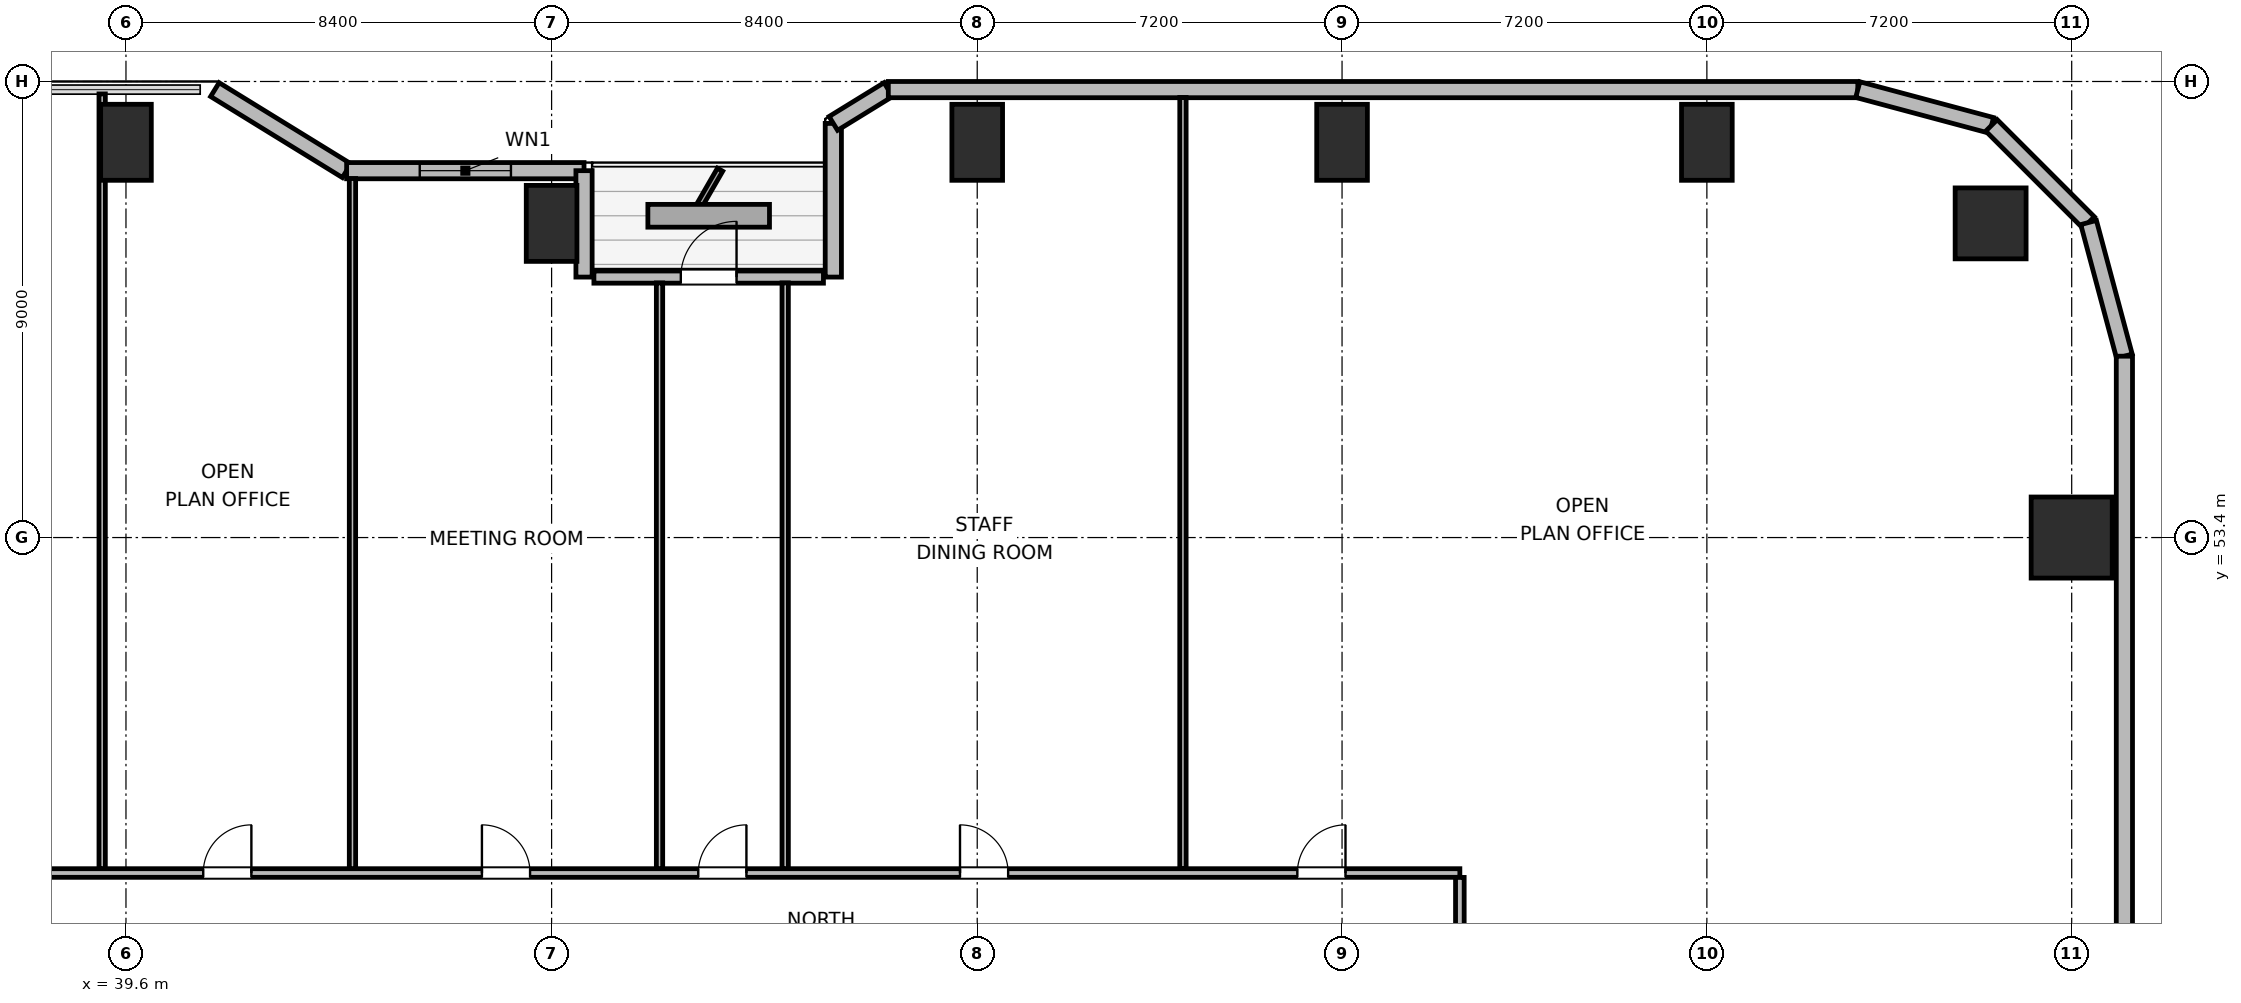
"""IFC4 building model, lengths in metres.
Left out: names, types, materials, properties, quantities, classifications, styles, units other than length and angle.
Written with IfcOpenShell. Run it as: python <this file> out.ifc"""

import sys

from ifc_helpers import new_model, si_unit, direction, frame, frame_2d, origin, origin_2d, place, context, subcontext, project, spatial, rectangle, circle, extrude, element, fill, save


model = new_model("IFC4")
c1 = context("Model", 3, precision=1e-05, world=origin(), true_north=direction((0.0, 1.0)))
c2 = subcontext(c1, "Body", "Model", "MODEL_VIEW")
j1 = project(units=[si_unit("LENGTHUNIT", "METRE"), si_unit("PLANEANGLEUNIT", "RADIAN")], contexts=[c1])
p1 = place(None, origin())
s1 = spatial("IfcSite", under=j1, at=p1, CompositionType="ELEMENT")
p2 = place(p1, origin())
s2 = spatial("IfcBuilding", under=s1, at=p2, CompositionType="ELEMENT")
p3 = place(p2, frame((0.0, 0.0, 33.3)))
s3 = spatial("IfcBuildingStorey", under=s2, at=p3, CompositionType="ELEMENT", Elevation=33.3)
p4 = place(p3, frame((76.4, 59.6, 0.0), z_axis=(0.0, 0.0, 1.0), x_axis=(1.0, 0.0, 0.0)))
e1 = element("IfcColumn", 1, at=p4, inside=s3, PredefinedType="COLUMN", context=c2, shape_type="SweptSolid", body=[
    extrude(circle(Radius=0.7, at=origin_2d()), origin(), (0.0, 0.0, 1.0), 3.9),
])
for number, where, z_axis, x_axis in (
    (2, (39.6, 61.2, 0.0), (0.0, 0.0, 1.0), (1.0, 0.0, 0.0)),
    (3, (48.0, 59.6, 0.0), (0.0, 0.0, 1.0), (1.0, 0.0, 0.0)),
    (4, (56.4, 61.2, 0.0), (0.0, 0.0, 1.0), (1.0, 0.0, 0.0)),
    (5, (63.6, 61.2, 0.0), (0.0, 0.0, 1.0), (1.0, 0.0, 0.0)),
    (6, (70.8, 61.2, 0.0), (0.0, 0.0, 1.0), (1.0, 0.0, 0.0)),
):
    element("IfcColumn", number, at=place(p3, frame(where, z_axis=z_axis, x_axis=x_axis)), inside=s3, PredefinedType="COLUMN", context=c2, shape_type="SweptSolid", body=[
        extrude(rectangle(XDim=1.0, YDim=1.5, at=origin_2d()), origin(), (0.0, 0.0, 1.0), 3.9),
    ])
p5 = place(p3, frame((78.0, 53.4, 0.0), z_axis=(0.0, 0.0, 1.0), x_axis=(1.0, 0.0, 0.0)))
e7 = element("IfcColumn", 7, at=p5, inside=s3, PredefinedType="COLUMN", context=c2, shape_type="SweptSolid", body=[
    extrude(rectangle(XDim=1.6, YDim=1.6, at=origin_2d()), origin(), (0.0, 0.0, 1.0), 3.9),
])
p6 = place(p3, frame((41.355, 62.24, 0.0), z_axis=(0.0, 0.0, 1.0), x_axis=(0.851630857047, -0.524142044989, 0.0)))
e8 = element("IfcWall", 8, at=p6, inside=s3, PredefinedType="SOLIDWALL", context=c2, shape_type="SweptSolid", body=[
    extrude(rectangle(XDim=3.053, YDim=0.32, at=frame_2d((1.526, 0.0))), origin(), (0.0, 0.0, 1.0), 2.875),
])
p7 = place(p3, frame((43.955, 60.64, 0.0), z_axis=(0.0, 0.0, 1.0), x_axis=(1.0, 0.0, 0.0)))
e9 = element("IfcWall", 9, at=p7, inside=s3, PredefinedType="SOLIDWALL", context=c2, shape_type="SweptSolid", body=[
    extrude(rectangle(XDim=4.685, YDim=0.32, at=frame_2d((2.343, 0.0))), origin(), (0.0, 0.0, 1.0), 2.875),
])
p8 = place(p7, frame((1.443, 0.0, 0.85)))
e10 = element("IfcOpeningElement", 10, at=p8, cuts=e9, PredefinedType="OPENING", context=c2, shape_type="SweptSolid", body=[
    extrude(rectangle(XDim=1.8, YDim=1.1, at=frame_2d((0.9, 0.55))), frame((0.0, 0.17, 0.0), z_axis=(0.0, -1.0, 0.0), x_axis=(1.0, 0.0, 0.0)), (0.0, 0.0, 1.0), 0.34),
])
p9 = place(p3, frame((48.64, 60.64, 0.0), z_axis=(0.0, 0.0, 1.0), x_axis=(0.0, -1.0, 0.0)))
e11 = element("IfcWall", 11, at=p9, inside=s3, PredefinedType="SOLIDWALL", context=c2, shape_type="SweptSolid", body=[
    extrude(rectangle(XDim=2.1, YDim=0.32, at=frame_2d((1.05, 0.0))), origin(), (0.0, 0.0, 1.0), 2.875),
])
p10 = place(p3, frame((48.835, 58.54, 0.0), z_axis=(0.0, 0.0, 1.0), x_axis=(1.0, 0.0, 0.0)))
e12 = element("IfcWall", 12, at=p10, inside=s3, PredefinedType="SOLIDWALL", context=c2, shape_type="SweptSolid", body=[
    extrude(rectangle(XDim=4.53, YDim=0.24, at=frame_2d((2.265, 0.0))), origin(), (0.0, 0.0, 1.0), 3.64),
])
p11 = place(p10, frame((1.715, 0.0, 0.0)))
e13 = element("IfcOpeningElement", 13, at=p11, cuts=e12, PredefinedType="OPENING", context=c2, shape_type="SweptSolid", body=[
    extrude(rectangle(XDim=1.1, YDim=2.04, at=frame_2d((0.55, 1.02))), frame((0.0, 0.13, 0.0), z_axis=(0.0, -1.0, 0.0), x_axis=(1.0, 0.0, 0.0)), (0.0, 0.0, 1.0), 0.26),
])
p12 = place(p3, frame((53.56, 58.54, 0.0), z_axis=(0.0, 0.0, 1.0), x_axis=(0.0, 1.0, 0.0)))
e14 = element("IfcWall", 14, at=p12, inside=s3, PredefinedType="SOLIDWALL", context=c2, shape_type="SweptSolid", body=[
    extrude(rectangle(XDim=3.032, YDim=0.32, at=frame_2d((1.516, 0.0))), origin(), (0.0, 0.0, 1.0), 2.875),
])
p13 = place(p3, frame((53.56, 61.573, 0.0), z_axis=(0.0, 0.0, 1.0), x_axis=(0.851776724646, 0.523904964045, 0.0)))
e15 = element("IfcWall", 15, at=p13, inside=s3, PredefinedType="SOLIDWALL", context=c2, shape_type="SweptSolid", body=[
    extrude(rectangle(XDim=1.274, YDim=0.32, at=frame_2d((0.637, 0.0))), origin(), (0.0, 0.0, 1.0), 3.64),
])
p14 = place(p3, frame((54.645, 62.24, 0.0), z_axis=(0.0, 0.0, 1.0), x_axis=(1.0, 0.0, 0.0)))
e16 = element("IfcWall", 16, at=p14, inside=s3, PredefinedType="SOLIDWALL", context=c2, shape_type="SweptSolid", body=[
    extrude(rectangle(XDim=19.134, YDim=0.32, at=frame_2d((9.567, 0.0))), origin(), (0.0, 0.0, 1.0), 3.64),
])
p15 = place(p3, frame((73.779, 62.24, 0.0), z_axis=(0.0, 0.0, 1.0), x_axis=(0.965964405026, -0.25867502435, 0.0)))
e17 = element("IfcWall", 17, at=p15, inside=s3, PredefinedType="SOLIDWALL", context=c2, shape_type="SweptSolid", body=[
    extrude(rectangle(XDim=2.731, YDim=0.32, at=frame_2d((1.366, 0.0))), origin(), (0.0, 0.0, 1.0), 3.64),
])
p16 = place(p3, frame((76.417, 61.533, 0.0), z_axis=(0.0, 0.0, 1.0), x_axis=(0.707106781187, -0.707106781187, 0.0)))
e18 = element("IfcWall", 18, at=p16, inside=s3, PredefinedType="SOLIDWALL", context=c2, shape_type="SweptSolid", body=[
    extrude(rectangle(XDim=2.71, YDim=0.32, at=frame_2d((1.355, 0.0))), origin(), (0.0, 0.0, 1.0), 3.64),
])
p17 = place(p3, frame((78.333, 59.617, 0.0), z_axis=(0.0, 0.0, 1.0), x_axis=(0.25869736047, -0.965958423373, 0.0)))
e19 = element("IfcWall", 19, at=p17, inside=s3, PredefinedType="SOLIDWALL", context=c2, shape_type="SweptSolid", body=[
    extrude(rectangle(XDim=2.731, YDim=0.32, at=frame_2d((1.366, 0.0))), origin(), (0.0, 0.0, 1.0), 3.64),
])
p18 = place(p3, frame((79.04, 56.979, 0.0), z_axis=(0.0, 0.0, 1.0), x_axis=(0.0, -1.0, 0.0)))
e20 = element("IfcWall", 20, at=p18, inside=s3, PredefinedType="SOLIDWALL", context=c2, shape_type="SweptSolid", body=[
    extrude(rectangle(XDim=14.219, YDim=0.32, at=frame_2d((7.109, 0.0))), origin(), (0.0, 0.0, 1.0), 3.64),
])
p19 = place(p3, frame((30.075, 46.78, 0.0), z_axis=(0.0, 0.0, 1.0), x_axis=(1.0, 0.0, 0.0)))
e21 = element("IfcWall", 21, at=p19, inside=s3, PredefinedType="PARTITIONING", context=c2, shape_type="SweptSolid", body=[
    extrude(rectangle(XDim=35.85, YDim=0.17, at=frame_2d((17.925, 0.0))), origin(), (0.0, 0.0, 1.0), 3.64),
])
p20 = place(p19, frame((4.053, 0.0, 0.0)))
e22 = element("IfcOpeningElement", 22, at=p20, cuts=e21, PredefinedType="OPENING", context=c2, shape_type="SweptSolid", body=[
    extrude(rectangle(XDim=0.95, YDim=2.04, at=frame_2d((0.475, 1.02))), frame((0.0, 0.095, 0.0), z_axis=(0.0, -1.0, 0.0), x_axis=(1.0, 0.0, 0.0)), (0.0, 0.0, 1.0), 0.19),
])
p21 = place(p19, frame((11.05, 0.0, 0.0)))
e23 = element("IfcOpeningElement", 23, at=p21, cuts=e21, PredefinedType="OPENING", context=c2, shape_type="SweptSolid", body=[
    extrude(rectangle(XDim=0.95, YDim=2.04, at=frame_2d((0.475, 1.02))), frame((0.0, 0.095, 0.0), z_axis=(0.0, -1.0, 0.0), x_axis=(1.0, 0.0, 0.0)), (0.0, 0.0, 1.0), 0.19),
])
p22 = place(p19, frame((16.55, 0.0, 0.0)))
e24 = element("IfcOpeningElement", 24, at=p22, cuts=e21, PredefinedType="OPENING", context=c2, shape_type="SweptSolid", body=[
    extrude(rectangle(XDim=0.95, YDim=2.04, at=frame_2d((0.475, 1.02))), frame((0.0, 0.095, 0.0), z_axis=(0.0, -1.0, 0.0), x_axis=(1.0, 0.0, 0.0)), (0.0, 0.0, 1.0), 0.19),
])
p23 = place(p19, frame((20.82, 0.0, 0.0)))
e25 = element("IfcOpeningElement", 25, at=p23, cuts=e21, PredefinedType="OPENING", context=c2, shape_type="SweptSolid", body=[
    extrude(rectangle(XDim=0.95, YDim=2.04, at=frame_2d((0.475, 1.02))), frame((0.0, 0.095, 0.0), z_axis=(0.0, -1.0, 0.0), x_axis=(1.0, 0.0, 0.0)), (0.0, 0.0, 1.0), 0.19),
])
p24 = place(p19, frame((25.985, 0.0, 0.0)))
e26 = element("IfcOpeningElement", 26, at=p24, cuts=e21, PredefinedType="OPENING", context=c2, shape_type="SweptSolid", body=[
    extrude(rectangle(XDim=0.95, YDim=2.04, at=frame_2d((0.475, 1.02))), frame((0.0, 0.095, 0.0), z_axis=(0.0, -1.0, 0.0), x_axis=(1.0, 0.0, 0.0)), (0.0, 0.0, 1.0), 0.19),
])
p25 = place(p19, frame((32.643, 0.0, 0.0)))
e27 = element("IfcOpeningElement", 27, at=p25, cuts=e21, PredefinedType="OPENING", context=c2, shape_type="SweptSolid", body=[
    extrude(rectangle(XDim=0.95, YDim=2.04, at=frame_2d((0.475, 1.02))), frame((0.0, 0.095, 0.0), z_axis=(0.0, -1.0, 0.0), x_axis=(1.0, 0.0, 0.0)), (0.0, 0.0, 1.0), 0.19),
])
p26 = place(p3, frame((65.925, 25.307, 0.0), z_axis=(0.0, 0.0, 1.0), x_axis=(0.0, 1.0, 0.0)))
e28 = element("IfcWall", 28, at=p26, inside=s3, PredefinedType="PARTITIONING", context=c2, shape_type="SweptSolid", body=[
    extrude(rectangle(XDim=21.386, YDim=0.17, at=frame_2d((10.693, 0.0))), origin(), (0.0, 0.0, 1.0), 3.64),
])
p27 = place(p26, frame((5.428, 0.0, 0.0)))
e29 = element("IfcOpeningElement", 29, at=p27, cuts=e28, PredefinedType="OPENING", context=c2, shape_type="SweptSolid", body=[
    extrude(rectangle(XDim=0.95, YDim=2.04, at=frame_2d((0.475, 1.02))), frame((0.0, 0.095, 0.0), z_axis=(0.0, -1.0, 0.0), x_axis=(1.0, 0.0, 0.0)), (0.0, 0.0, 1.0), 0.19),
])
p28 = place(p26, frame((16.208, 0.0, 0.0)))
e30 = element("IfcOpeningElement", 30, at=p28, cuts=e28, PredefinedType="OPENING", context=c2, shape_type="SweptSolid", body=[
    extrude(rectangle(XDim=0.95, YDim=2.04, at=frame_2d((0.475, 1.02))), frame((0.0, 0.095, 0.0), z_axis=(0.0, -1.0, 0.0), x_axis=(1.0, 0.0, 0.0)), (0.0, 0.0, 1.0), 0.19),
])
p29 = place(p3, frame((39.13, 46.867, 0.0), z_axis=(0.0, 0.0, 1.0), x_axis=(0.0, 1.0, 0.0)))
e31 = element("IfcWall", 31, at=p29, inside=s3, PredefinedType="PARTITIONING", context=c2, shape_type="SweptSolid", body=[
    extrude(rectangle(XDim=15.288, YDim=0.125, at=frame_2d((7.644, 0.0))), origin(), (0.0, 0.0, 1.0), 3.64),
])
p30 = place(p3, frame((44.07, 46.867, 0.0), z_axis=(0.0, 0.0, 1.0), x_axis=(0.0, 1.0, 0.0)))
e32 = element("IfcWall", 32, at=p30, inside=s3, PredefinedType="PARTITIONING", context=c2, shape_type="SweptSolid", body=[
    extrude(rectangle(XDim=13.618, YDim=0.125, at=frame_2d((6.809, 0.0))), origin(), (0.0, 0.0, 1.0), 3.003),
])
p31 = place(p3, frame((50.13, 46.867, 0.0), z_axis=(0.0, 0.0, 1.0), x_axis=(0.0, 1.0, 0.0)))
e33 = element("IfcWall", 33, at=p31, inside=s3, PredefinedType="PARTITIONING", context=c2, shape_type="SweptSolid", body=[
    extrude(rectangle(XDim=11.558, YDim=0.125, at=frame_2d((5.779, 0.0))), origin(), (0.0, 0.0, 1.0), 3.64),
])
p32 = place(p3, frame((52.61, 46.867, 0.0), z_axis=(0.0, 0.0, 1.0), x_axis=(0.0, 1.0, 0.0)))
e34 = element("IfcWall", 34, at=p32, inside=s3, PredefinedType="PARTITIONING", context=c2, shape_type="SweptSolid", body=[
    extrude(rectangle(XDim=11.558, YDim=0.125, at=frame_2d((5.779, 0.0))), origin(), (0.0, 0.0, 1.0), 3.003),
])
p33 = place(p3, frame((60.46, 46.867, 0.0), z_axis=(0.0, 0.0, 1.0), x_axis=(0.0, 1.0, 0.0)))
e35 = element("IfcWall", 35, at=p33, inside=s3, PredefinedType="PARTITIONING", context=c2, shape_type="SweptSolid", body=[
    extrude(rectangle(XDim=15.218, YDim=0.125, at=frame_2d((7.609, 0.0))), origin(), (0.0, 0.0, 1.0), 3.64),
])
p34 = place(p8, origin())
e36 = element("IfcWindow", 36, at=p34, inside=s3, PartitioningType="SINGLE_PANEL", PredefinedType="WINDOW", context=c2, shape_type="SweptSolid", body=[
    extrude(rectangle(XDim=1.8, YDim=1.1, at=frame_2d((0.9, 0.55))), frame((0.0, 0.03, 0.0), z_axis=(0.0, -1.0, 0.0), x_axis=(1.0, 0.0, 0.0)), (0.0, 0.0, 1.0), 0.06),
])
fill(e10, e36)
p35 = place(p11, origin())
e37 = element("IfcDoor", 37, at=p35, inside=s3, OperationType="SINGLE_SWING_RIGHT", PredefinedType="DOOR", context=c2, shape_type="SweptSolid", body=[
    extrude(rectangle(XDim=1.1, YDim=2.04, at=frame_2d((0.55, 1.02))), frame((0.0, 0.025, 0.0), z_axis=(0.0, -1.0, 0.0), x_axis=(1.0, 0.0, 0.0)), (0.0, 0.0, 1.0), 0.05),
])
fill(e13, e37)
p36 = place(p21, origin())
e38 = element("IfcDoor", 38, at=p36, inside=s3, OperationType="SINGLE_SWING_RIGHT", PredefinedType="DOOR", context=c2, shape_type="SweptSolid", body=[
    extrude(rectangle(XDim=0.95, YDim=2.04, at=frame_2d((0.475, 1.02))), frame((0.0, 0.025, 0.0), z_axis=(0.0, -1.0, 0.0), x_axis=(1.0, 0.0, 0.0)), (0.0, 0.0, 1.0), 0.05),
])
fill(e23, e38)
p37 = place(p22, origin())
e39 = element("IfcDoor", 39, at=p37, inside=s3, OperationType="SINGLE_SWING_LEFT", PredefinedType="DOOR", context=c2, shape_type="SweptSolid", body=[
    extrude(rectangle(XDim=0.95, YDim=2.04, at=frame_2d((0.475, 1.02))), frame((0.0, 0.025, 0.0), z_axis=(0.0, -1.0, 0.0), x_axis=(1.0, 0.0, 0.0)), (0.0, 0.0, 1.0), 0.05),
])
fill(e24, e39)
p38 = place(p23, origin())
e40 = element("IfcDoor", 40, at=p38, inside=s3, OperationType="SINGLE_SWING_RIGHT", PredefinedType="DOOR", context=c2, shape_type="SweptSolid", body=[
    extrude(rectangle(XDim=0.95, YDim=2.04, at=frame_2d((0.475, 1.02))), frame((0.0, 0.025, 0.0), z_axis=(0.0, -1.0, 0.0), x_axis=(1.0, 0.0, 0.0)), (0.0, 0.0, 1.0), 0.05),
])
fill(e25, e40)
p39 = place(p24, origin())
e41 = element("IfcDoor", 41, at=p39, inside=s3, OperationType="SINGLE_SWING_LEFT", PredefinedType="DOOR", context=c2, shape_type="SweptSolid", body=[
    extrude(rectangle(XDim=0.95, YDim=2.04, at=frame_2d((0.475, 1.02))), frame((0.0, 0.025, 0.0), z_axis=(0.0, -1.0, 0.0), x_axis=(1.0, 0.0, 0.0)), (0.0, 0.0, 1.0), 0.05),
])
fill(e26, e41)
p40 = place(p25, origin())
e42 = element("IfcDoor", 42, at=p40, inside=s3, OperationType="SINGLE_SWING_RIGHT", PredefinedType="DOOR", context=c2, shape_type="SweptSolid", body=[
    extrude(rectangle(XDim=0.95, YDim=2.04, at=frame_2d((0.475, 1.02))), frame((0.0, 0.025, 0.0), z_axis=(0.0, -1.0, 0.0), x_axis=(1.0, 0.0, 0.0)), (0.0, 0.0, 1.0), 0.05),
])
fill(e27, e42)
save(model, sys.argv[1])
